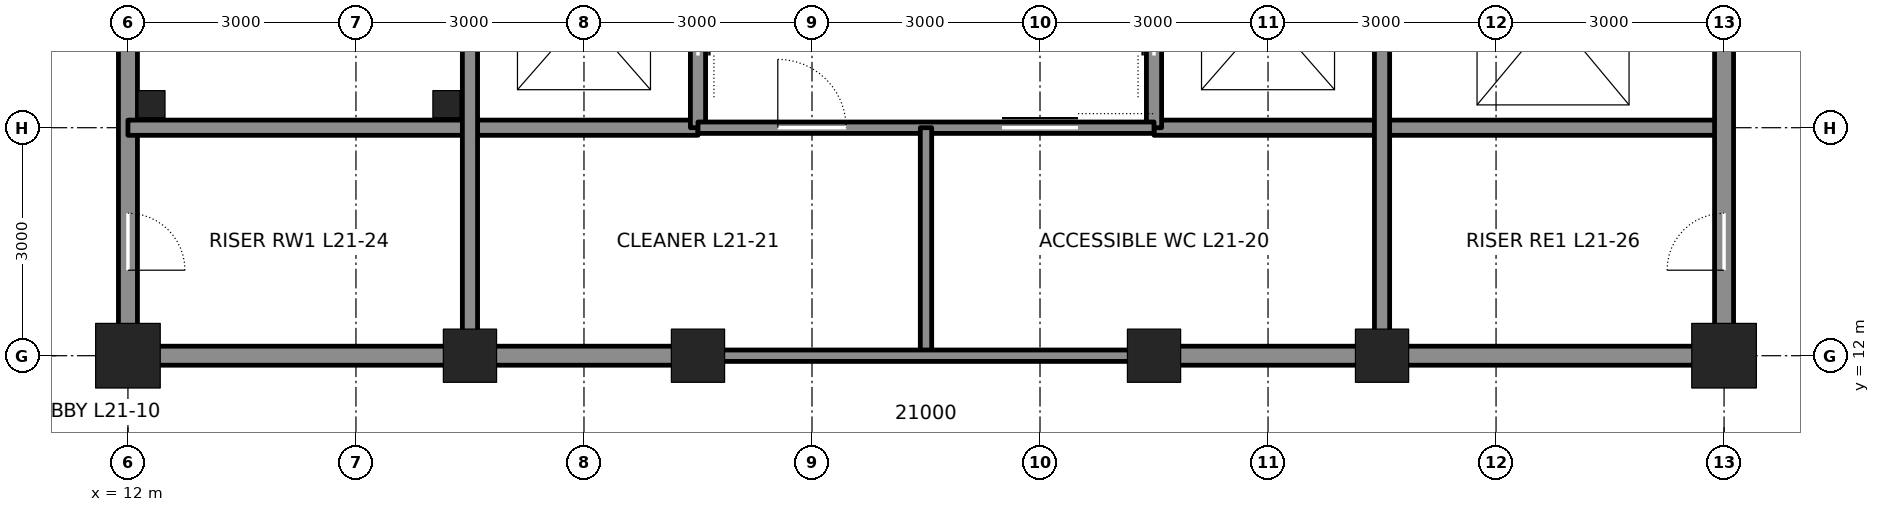
"""IFC4 building model, lengths in metres.
Left out: names, types, materials, properties, quantities, classifications, styles, units other than length and angle.
Written with IfcOpenShell. Run it as: python <this file> out.ifc"""

import sys

from ifc_helpers import new_model, si_unit, direction, frame, frame_2d, origin, origin_2d, place, context, subcontext, project, spatial, rectangle, hollow_rectangle, extrude, element, fill, save


model = new_model("IFC4")
c1 = context("Model", 3, precision=1e-05, world=origin(), true_north=direction((0.0, 1.0)))
c2 = subcontext(c1, "Body", "Model", "MODEL_VIEW")
j1 = project(units=[si_unit("LENGTHUNIT", "METRE"), si_unit("PLANEANGLEUNIT", "RADIAN")], contexts=[c1])
p1 = place(None, origin())
s1 = spatial("IfcSite", under=j1, at=p1, CompositionType="ELEMENT")
p2 = place(p1, origin())
s2 = spatial("IfcBuilding", under=s1, at=p2, CompositionType="ELEMENT")
p3 = place(p2, frame((0.0, 0.0, 102.3)))
s3 = spatial("IfcBuildingStorey", under=s2, at=p3, CompositionType="ELEMENT", Elevation=102.3)
p4 = place(p3, frame((12.0, 12.0, 0.0), z_axis=(0.0, 0.0, 1.0), x_axis=(1.0, 0.0, 0.0)))
e1 = element("IfcColumn", 1, at=p4, inside=s3, PredefinedType="COLUMN", context=c2, shape_type="SweptSolid", body=[
    extrude(hollow_rectangle(XDim=0.85, YDim=0.85, WallThickness=0.085, at=origin_2d()), origin(), (0.0, 0.0, 1.0), 4.5),
])
for number, where, z_axis, x_axis in (
    (2, (16.5, 12.0, 0.0), (0.0, 0.0, 1.0), (1.0, 0.0, 0.0)),
    (3, (19.5, 12.0, 0.0), (0.0, 0.0, 1.0), (1.0, 0.0, 0.0)),
    (4, (25.5, 12.0, 0.0), (0.0, 0.0, 1.0), (1.0, 0.0, 0.0)),
    (5, (28.5, 12.0, 0.0), (0.0, 0.0, 1.0), (1.0, 0.0, 0.0)),
):
    element("IfcColumn", number, at=place(p3, frame(where, z_axis=z_axis, x_axis=x_axis)), inside=s3, PredefinedType="COLUMN", context=c2, shape_type="SweptSolid", body=[
        extrude(hollow_rectangle(XDim=0.7, YDim=0.7, WallThickness=0.07, at=origin_2d()), origin(), (0.0, 0.0, 1.0), 4.5),
    ])
p5 = place(p3, frame((33.0, 12.0, 0.0), z_axis=(0.0, 0.0, 1.0), x_axis=(1.0, 0.0, 0.0)))
e6 = element("IfcColumn", 6, at=p5, inside=s3, PredefinedType="COLUMN", context=c2, shape_type="SweptSolid", body=[
    extrude(hollow_rectangle(XDim=0.85, YDim=0.85, WallThickness=0.085, at=origin_2d()), origin(), (0.0, 0.0, 1.0), 4.5),
])
p6 = place(p3, frame((12.0, 12.25, 0.0), z_axis=(0.0, 0.0, 1.0), x_axis=(0.0, 1.0, 0.0)))
e7 = element("IfcWall", 7, at=p6, inside=s3, PredefinedType="SOLIDWALL", context=c2, shape_type="SweptSolid", body=[
    extrude(rectangle(XDim=8.5, YDim=0.25, at=frame_2d((4.25, 0.0))), origin(), (0.0, 0.0, 1.0), 3.413),
])
p7 = place(p6, frame((0.875, 0.0, 0.0)))
e8 = element("IfcOpeningElement", 8, at=p7, cuts=e7, PredefinedType="OPENING", context=c2, shape_type="SweptSolid", body=[
    extrude(rectangle(XDim=0.75, YDim=2.1, at=frame_2d((0.375, 1.05))), frame((0.0, 0.135, 0.0), z_axis=(0.0, -1.0, 0.0), x_axis=(1.0, 0.0, 0.0)), (0.0, 0.0, 1.0), 0.27),
])
p8 = place(p3, frame((12.25, 12.0, 0.0), z_axis=(0.0, 0.0, 1.0), x_axis=(1.0, 0.0, 0.0)))
e9 = element("IfcWall", 9, at=p8, inside=s3, PredefinedType="SOLIDWALL", context=c2, shape_type="SweptSolid", body=[
    extrude(rectangle(XDim=4.0, YDim=0.25, at=frame_2d((2.0, 0.0))), origin(), (0.0, 0.0, 1.0), 3.481),
])
for number, where, z_axis, x_axis in (
    (10, (16.75, 12.0, 0.0), (0.0, 0.0, 1.0), (1.0, 0.0, 0.0)),
    (11, (25.75, 12.0, 0.0), (0.0, 0.0, 1.0), (1.0, 0.0, 0.0)),
):
    element("IfcWall", number, at=place(p3, frame(where, z_axis=z_axis, x_axis=x_axis)), inside=s3, PredefinedType="SOLIDWALL", context=c2, shape_type="SweptSolid", body=[
        extrude(rectangle(XDim=2.5, YDim=0.25, at=frame_2d((1.25, 0.0))), origin(), (0.0, 0.0, 1.0), 3.481),
    ])
p9 = place(p3, frame((28.75, 12.0, 0.0), z_axis=(0.0, 0.0, 1.0), x_axis=(1.0, 0.0, 0.0)))
e12 = element("IfcWall", 12, at=p9, inside=s3, PredefinedType="SOLIDWALL", context=c2, shape_type="SweptSolid", body=[
    extrude(rectangle(XDim=4.0, YDim=0.25, at=frame_2d((2.0, 0.0))), origin(), (0.0, 0.0, 1.0), 3.481),
])
for number, where, z_axis, x_axis in (
    (13, (12.0, 15.0, 0.0), (0.0, 0.0, 1.0), (1.0, 0.0, 0.0)),
    (14, (25.5, 15.0, 0.0), (0.0, 0.0, 1.0), (1.0, 0.0, 0.0)),
):
    element("IfcWall", number, at=place(p3, frame(where, z_axis=z_axis, x_axis=x_axis)), inside=s3, PredefinedType="SOLIDWALL", context=c2, shape_type="SweptSolid", body=[
        extrude(rectangle(XDim=7.5, YDim=0.2, at=frame_2d((3.75, 0.0))), origin(), (0.0, 0.0, 1.0), 4.34),
    ])
p10 = place(p3, frame((16.5, 12.25, 0.0), z_axis=(0.0, 0.0, 1.0), x_axis=(0.0, 1.0, 0.0)))
e15 = element("IfcWall", 15, at=p10, inside=s3, PredefinedType="SOLIDWALL", context=c2, shape_type="SweptSolid", body=[
    extrude(rectangle(XDim=8.5, YDim=0.2, at=frame_2d((4.25, 0.0))), origin(), (0.0, 0.0, 1.0), 3.413),
])
p11 = place(p3, frame((19.5, 15.0, 0.0), z_axis=(0.0, 0.0, 1.0), x_axis=(0.0, 1.0, 0.0)))
e16 = element("IfcWall", 16, at=p11, inside=s3, PredefinedType="SOLIDWALL", context=c2, shape_type="SweptSolid", body=[
    extrude(rectangle(XDim=12.0, YDim=0.2, at=frame_2d((6.0, 0.0))), origin(), (0.0, 0.0, 1.0), 3.365),
])
p12 = place(p11, frame((0.95, 0.0, 0.0)))
e17 = element("IfcOpeningElement", 17, at=p12, cuts=e16, PredefinedType="OPENING", context=c2, shape_type="SweptSolid", body=[
    extrude(rectangle(XDim=1.1, YDim=2.1, at=frame_2d((0.55, 1.05))), frame((0.0, 0.11, 0.0), z_axis=(0.0, -1.0, 0.0), x_axis=(1.0, 0.0, 0.0)), (0.0, 0.0, 1.0), 0.22),
])
p13 = place(p11, frame((3.95, 0.0, 0.0)))
e18 = element("IfcOpeningElement", 18, at=p13, cuts=e16, PredefinedType="OPENING", context=c2, shape_type="SweptSolid", body=[
    extrude(rectangle(XDim=1.1, YDim=2.1, at=frame_2d((0.55, 1.05))), frame((0.0, 0.11, 0.0), z_axis=(0.0, -1.0, 0.0), x_axis=(1.0, 0.0, 0.0)), (0.0, 0.0, 1.0), 0.22),
])
p14 = place(p11, frame((6.95, 0.0, 0.0)))
e19 = element("IfcOpeningElement", 19, at=p14, cuts=e16, PredefinedType="OPENING", context=c2, shape_type="SweptSolid", body=[
    extrude(rectangle(XDim=1.1, YDim=2.1, at=frame_2d((0.55, 1.05))), frame((0.0, 0.11, 0.0), z_axis=(0.0, -1.0, 0.0), x_axis=(1.0, 0.0, 0.0)), (0.0, 0.0, 1.0), 0.22),
])
p15 = place(p11, frame((9.95, 0.0, 0.0)))
e20 = element("IfcOpeningElement", 20, at=p15, cuts=e16, PredefinedType="OPENING", context=c2, shape_type="SweptSolid", body=[
    extrude(rectangle(XDim=1.1, YDim=2.1, at=frame_2d((0.55, 1.05))), frame((0.0, 0.11, 0.0), z_axis=(0.0, -1.0, 0.0), x_axis=(1.0, 0.0, 0.0)), (0.0, 0.0, 1.0), 0.22),
])
p16 = place(p3, frame((25.5, 15.0, 0.0), z_axis=(0.0, 0.0, 1.0), x_axis=(0.0, 1.0, 0.0)))
e21 = element("IfcWall", 21, at=p16, inside=s3, PredefinedType="SOLIDWALL", context=c2, shape_type="SweptSolid", body=[
    extrude(rectangle(XDim=12.0, YDim=0.2, at=frame_2d((6.0, 0.0))), origin(), (0.0, 0.0, 1.0), 3.365),
])
p17 = place(p16, frame((0.95, 0.0, 0.0)))
e22 = element("IfcOpeningElement", 22, at=p17, cuts=e21, PredefinedType="OPENING", context=c2, shape_type="SweptSolid", body=[
    extrude(rectangle(XDim=1.1, YDim=2.1, at=frame_2d((0.55, 1.05))), frame((0.0, 0.11, 0.0), z_axis=(0.0, -1.0, 0.0), x_axis=(1.0, 0.0, 0.0)), (0.0, 0.0, 1.0), 0.22),
])
p18 = place(p16, frame((3.95, 0.0, 0.0)))
e23 = element("IfcOpeningElement", 23, at=p18, cuts=e21, PredefinedType="OPENING", context=c2, shape_type="SweptSolid", body=[
    extrude(rectangle(XDim=1.1, YDim=2.1, at=frame_2d((0.55, 1.05))), frame((0.0, 0.11, 0.0), z_axis=(0.0, -1.0, 0.0), x_axis=(1.0, 0.0, 0.0)), (0.0, 0.0, 1.0), 0.22),
])
p19 = place(p16, frame((6.95, 0.0, 0.0)))
e24 = element("IfcOpeningElement", 24, at=p19, cuts=e21, PredefinedType="OPENING", context=c2, shape_type="SweptSolid", body=[
    extrude(rectangle(XDim=1.1, YDim=2.1, at=frame_2d((0.55, 1.05))), frame((0.0, 0.11, 0.0), z_axis=(0.0, -1.0, 0.0), x_axis=(1.0, 0.0, 0.0)), (0.0, 0.0, 1.0), 0.22),
])
p20 = place(p16, frame((9.95, 0.0, 0.0)))
e25 = element("IfcOpeningElement", 25, at=p20, cuts=e21, PredefinedType="OPENING", context=c2, shape_type="SweptSolid", body=[
    extrude(rectangle(XDim=1.1, YDim=2.1, at=frame_2d((0.55, 1.05))), frame((0.0, 0.11, 0.0), z_axis=(0.0, -1.0, 0.0), x_axis=(1.0, 0.0, 0.0)), (0.0, 0.0, 1.0), 0.22),
])
p21 = place(p3, frame((28.5, 12.25, 0.0), z_axis=(0.0, 0.0, 1.0), x_axis=(0.0, 1.0, 0.0)))
e26 = element("IfcWall", 26, at=p21, inside=s3, PredefinedType="SOLIDWALL", context=c2, shape_type="SweptSolid", body=[
    extrude(rectangle(XDim=8.5, YDim=0.2, at=frame_2d((4.25, 0.0))), origin(), (0.0, 0.0, 1.0), 3.413),
])
p22 = place(p3, frame((33.0, 12.25, 0.0), z_axis=(0.0, 0.0, 1.0), x_axis=(0.0, 1.0, 0.0)))
e27 = element("IfcWall", 27, at=p22, inside=s3, PredefinedType="SOLIDWALL", context=c2, shape_type="SweptSolid", body=[
    extrude(rectangle(XDim=8.5, YDim=0.25, at=frame_2d((4.25, 0.0))), origin(), (0.0, 0.0, 1.0), 3.413),
])
p23 = place(p22, frame((6.65, 0.0, 0.0)))
e28 = element("IfcOpeningElement", 28, at=p23, cuts=e27, PredefinedType="OPENING", context=c2, shape_type="SweptSolid", body=[
    extrude(rectangle(XDim=1.2, YDim=2.1, at=frame_2d((0.6, 1.05))), frame((0.0, 0.135, 0.0), z_axis=(0.0, -1.0, 0.0), x_axis=(1.0, 0.0, 0.0)), (0.0, 0.0, 1.0), 0.27),
])
p24 = place(p22, frame((0.875, 0.0, 0.0)))
e29 = element("IfcOpeningElement", 29, at=p24, cuts=e27, PredefinedType="OPENING", context=c2, shape_type="SweptSolid", body=[
    extrude(rectangle(XDim=0.75, YDim=2.1, at=frame_2d((0.375, 1.05))), frame((0.0, 0.135, 0.0), z_axis=(0.0, -1.0, 0.0), x_axis=(1.0, 0.0, 0.0)), (0.0, 0.0, 1.0), 0.27),
])
p25 = place(p3, frame((19.5, 15.0, 0.0), z_axis=(0.0, 0.0, 1.0), x_axis=(1.0, 0.0, 0.0)))
e30 = element("IfcWall", 30, at=p25, inside=s3, PredefinedType="PARTITIONING", context=c2, shape_type="SweptSolid", body=[
    extrude(rectangle(XDim=6.0, YDim=0.15, at=frame_2d((3.0, 0.0))), origin(), (0.0, 0.0, 1.0), 4.34),
])
p26 = place(p25, frame((4.0, 0.0, 0.0)))
e31 = element("IfcOpeningElement", 31, at=p26, cuts=e30, PredefinedType="OPENING", context=c2, shape_type="SweptSolid", body=[
    extrude(rectangle(XDim=1.0, YDim=2.1, at=frame_2d((0.5, 1.05))), frame((0.0, 0.085, 0.0), z_axis=(0.0, -1.0, 0.0), x_axis=(1.0, 0.0, 0.0)), (0.0, 0.0, 1.0), 0.17),
])
p27 = place(p25, frame((1.05, 0.0, 0.0)))
e32 = element("IfcOpeningElement", 32, at=p27, cuts=e30, PredefinedType="OPENING", context=c2, shape_type="SweptSolid", body=[
    extrude(rectangle(XDim=0.9, YDim=2.1, at=frame_2d((0.45, 1.05))), frame((0.0, 0.085, 0.0), z_axis=(0.0, -1.0, 0.0), x_axis=(1.0, 0.0, 0.0)), (0.0, 0.0, 1.0), 0.17),
])
p28 = place(p3, frame((22.5, 15.0, 0.0), z_axis=(0.0, 0.0, 1.0), x_axis=(0.0, -1.0, 0.0)))
e33 = element("IfcWall", 33, at=p28, inside=s3, PredefinedType="PARTITIONING", context=c2, shape_type="SweptSolid", body=[
    extrude(rectangle(XDim=3.0, YDim=0.15, at=frame_2d((1.5, 0.0))), origin(), (0.0, 0.0, 1.0), 4.34),
])
p29 = place(p3, frame((19.5, 12.0, 0.0), z_axis=(0.0, 0.0, 1.0), x_axis=(1.0, 0.0, 0.0)))
e34 = element("IfcWall", 34, at=p29, inside=s3, PredefinedType="PARTITIONING", context=c2, shape_type="SweptSolid", body=[
    extrude(rectangle(XDim=6.0, YDim=0.15, at=frame_2d((3.0, 0.0))), origin(), (0.0, 0.0, 1.0), 3.481),
])
for number, where, z_axis, x_axis in (
    (35, (12.31, 15.31, 0.0), (0.0, 0.0, 1.0), (1.0, 0.0, 0.0)),
    (36, (16.19, 15.31, 0.0), (0.0, 0.0, 1.0), (1.0, 0.0, 0.0)),
):
    element("IfcColumn", number, at=place(p3, frame(where, z_axis=z_axis, x_axis=x_axis)), inside=s3, PredefinedType="COLUMN", context=c2, shape_type="SweptSolid", body=[
        extrude(hollow_rectangle(XDim=0.356, YDim=0.356, WallThickness=0.015, at=origin_2d()), origin(), (0.0, 0.0, 1.0), 4.5),
    ])
p30 = place(p7, frame((0.75, 0.0, 0.0), z_axis=(0.0, 0.0, 1.0), x_axis=(-1.0, 0.0, 0.0)))
e37 = element("IfcDoor", 37, at=p30, inside=s3, OperationType="SINGLE_SWING_RIGHT", PredefinedType="DOOR", context=c2, shape_type="SweptSolid", body=[
    extrude(rectangle(XDim=0.75, YDim=2.1, at=frame_2d((0.375, 1.05))), frame((0.0, 0.025, 0.0), z_axis=(0.0, -1.0, 0.0), x_axis=(1.0, 0.0, 0.0)), (0.0, 0.0, 1.0), 0.05),
])
fill(e8, e37)
p31 = place(p24, origin())
e38 = element("IfcDoor", 38, at=p31, inside=s3, OperationType="SINGLE_SWING_LEFT", PredefinedType="DOOR", context=c2, shape_type="SweptSolid", body=[
    extrude(rectangle(XDim=0.75, YDim=2.1, at=frame_2d((0.375, 1.05))), frame((0.0, 0.025, 0.0), z_axis=(0.0, -1.0, 0.0), x_axis=(1.0, 0.0, 0.0)), (0.0, 0.0, 1.0), 0.05),
])
fill(e29, e38)
p32 = place(p26, origin())
e39 = element("IfcDoor", 39, at=p32, inside=s3, OperationType="SLIDING_TO_LEFT", PredefinedType="DOOR", context=c2, shape_type="SweptSolid", body=[
    extrude(rectangle(XDim=1.0, YDim=2.1, at=frame_2d((0.5, 1.05))), frame((0.0, 0.025, 0.0), z_axis=(0.0, -1.0, 0.0), x_axis=(1.0, 0.0, 0.0)), (0.0, 0.0, 1.0), 0.05),
])
fill(e31, e39)
p33 = place(p27, origin())
e40 = element("IfcDoor", 40, at=p33, inside=s3, OperationType="SINGLE_SWING_LEFT", PredefinedType="DOOR", context=c2, shape_type="SweptSolid", body=[
    extrude(rectangle(XDim=0.9, YDim=2.1, at=frame_2d((0.45, 1.05))), frame((0.0, 0.025, 0.0), z_axis=(0.0, -1.0, 0.0), x_axis=(1.0, 0.0, 0.0)), (0.0, 0.0, 1.0), 0.05),
])
fill(e32, e40)
p34 = place(p12, origin())
e41 = element("IfcDoor", 41, at=p34, inside=s3, OperationType="DOUBLE_DOOR_SLIDING", PredefinedType="DOOR", context=c2, shape_type="SweptSolid", body=[
    extrude(rectangle(XDim=1.1, YDim=2.1, at=frame_2d((0.55, 1.05))), frame((0.0, 0.025, 0.0), z_axis=(0.0, -1.0, 0.0), x_axis=(1.0, 0.0, 0.0)), (0.0, 0.0, 1.0), 0.05),
])
fill(e17, e41)
p35 = place(p17, origin())
e42 = element("IfcDoor", 42, at=p35, inside=s3, OperationType="DOUBLE_DOOR_SLIDING", PredefinedType="DOOR", context=c2, shape_type="SweptSolid", body=[
    extrude(rectangle(XDim=1.1, YDim=2.1, at=frame_2d((0.55, 1.05))), frame((0.0, 0.025, 0.0), z_axis=(0.0, -1.0, 0.0), x_axis=(1.0, 0.0, 0.0)), (0.0, 0.0, 1.0), 0.05),
])
fill(e22, e42)
save(model, sys.argv[1])
